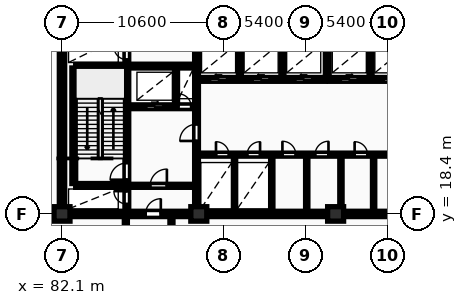
"""IFC4 building model, lengths in metres.
Left out: names, types, materials, properties, quantities, classifications, styles, units other than length and angle.
Written with IfcOpenShell. Run it as: python <this file> out.ifc"""

import sys

from ifc_helpers import new_model, si_unit, direction, frame, frame_2d, origin, origin_2d, place, context, subcontext, project, spatial, rectangle, extrude, element, fill, save


model = new_model("IFC4")
c1 = context("Model", 3, precision=1e-05, world=origin(), true_north=direction((0.0, 1.0)))
c2 = subcontext(c1, "Body", "Model", "MODEL_VIEW")
j1 = project(units=[si_unit("LENGTHUNIT", "METRE"), si_unit("PLANEANGLEUNIT", "RADIAN")], contexts=[c1])
p1 = place(None, origin())
s1 = spatial("IfcSite", under=j1, at=p1, CompositionType="ELEMENT")
p2 = place(p1, origin())
s2 = spatial("IfcBuilding", under=s1, at=p2, CompositionType="ELEMENT")
p3 = place(p2, origin())
s3 = spatial("IfcBuildingStorey", under=s2, at=p3, CompositionType="ELEMENT", Elevation=0.0)
for number, where, z_axis, x_axis in (
    (1, (82.1, 18.4, 0.0), (0.0, 0.0, 1.0), (1.0, 0.0, 0.0)),
    (2, (91.1, 18.4, 0.0), (0.0, 0.0, 1.0), (1.0, 0.0, 0.0)),
    (3, (100.1, 18.4, 0.0), (0.0, 0.0, 1.0), (1.0, 0.0, 0.0)),
):
    element("IfcColumn", number, at=place(p3, frame(where, z_axis=z_axis, x_axis=x_axis)), inside=s3, PredefinedType="COLUMN", context=c2, shape_type="SweptSolid", body=[
        extrude(rectangle(XDim=1.05, YDim=0.95, at=origin_2d()), origin(), (0.0, 0.0, 1.0), 5.4),
    ])
p4 = place(p3, frame((82.1, 18.575, 0.0), z_axis=(0.0, 0.0, 1.0), x_axis=(0.0, 1.0, 0.0)))
e4 = element("IfcWall", 4, at=p4, inside=s3, PredefinedType="SHEAR", context=c2, shape_type="SweptSolid", body=[
    extrude(rectangle(XDim=11.65, YDim=0.35, at=frame_2d((5.825, 0.0))), origin(), (0.0, 0.0, 1.0), 5.4),
])
p5 = place(p3, frame((81.925, 18.4, 0.0), z_axis=(0.0, 0.0, 1.0), x_axis=(1.0, 0.0, 0.0)))
e5 = element("IfcWall", 5, at=p5, inside=s3, PredefinedType="SHEAR", context=c2, shape_type="SweptSolid", body=[
    extrude(rectangle(XDim=36.265, YDim=0.35, at=frame_2d((18.132, 0.0))), origin(), (0.0, 0.0, 1.0), 5.4),
])
p6 = place(p5, frame((5.675, 0.0, 0.0)))
e6 = element("IfcOpeningElement", 6, at=p6, cuts=e5, PredefinedType="OPENING", context=c2, shape_type="SweptSolid", body=[
    extrude(rectangle(XDim=1.0, YDim=2.15, at=frame_2d((0.5, 1.075))), frame((0.0, 0.185, 0.0), z_axis=(0.0, -1.0, 0.0), x_axis=(1.0, 0.0, 0.0)), (0.0, 0.0, 1.0), 0.37),
])
p7 = place(p5, frame((21.925, 0.0, 0.0)))
e7 = element("IfcOpeningElement", 7, at=p7, cuts=e5, PredefinedType="OPENING", context=c2, shape_type="SweptSolid", body=[
    extrude(rectangle(XDim=1.5, YDim=2.2, at=frame_2d((0.75, 1.1))), frame((0.0, 0.185, 0.0), z_axis=(0.0, -1.0, 0.0), x_axis=(1.0, 0.0, 0.0)), (0.0, 0.0, 1.0), 0.37),
])
p8 = place(p5, frame((29.875, 0.0, 0.0)))
e8 = element("IfcOpeningElement", 8, at=p8, cuts=e5, PredefinedType="OPENING", context=c2, shape_type="SweptSolid", body=[
    extrude(rectangle(XDim=1.0, YDim=2.15, at=frame_2d((0.5, 1.075))), frame((0.0, 0.185, 0.0), z_axis=(0.0, -1.0, 0.0), x_axis=(1.0, 0.0, 0.0)), (0.0, 0.0, 1.0), 0.37),
])
p9 = place(p3, frame((82.875, 20.4, 0.0), z_axis=(0.0, 0.0, 1.0), x_axis=(0.0, 1.0, 0.0)))
e9 = element("IfcWall", 9, at=p9, inside=s3, PredefinedType="SHEAR", context=c2, shape_type="SweptSolid", body=[
    extrude(rectangle(XDim=7.6, YDim=0.25, at=frame_2d((3.8, 0.0))), origin(), (0.0, 0.0, 1.0), 5.4),
])
p10 = place(p3, frame((86.365, 18.6, 0.0), z_axis=(0.0, 0.0, 1.0), x_axis=(0.0, 1.0, 0.0)))
e10 = element("IfcWall", 10, at=p10, inside=s3, PredefinedType="SHEAR", context=c2, shape_type="SweptSolid", body=[
    extrude(rectangle(XDim=11.6, YDim=0.25, at=frame_2d((5.8, 0.0))), origin(), (0.0, 0.0, 1.0), 5.4),
])
p11 = place(p10, frame((0.45, 0.0, 0.0)))
e11 = element("IfcOpeningElement", 11, at=p11, cuts=e10, PredefinedType="OPENING", context=c2, shape_type="SweptSolid", body=[
    extrude(rectangle(XDim=0.85, YDim=2.05, at=frame_2d((0.425, 1.025))), frame((0.0, 0.135, 0.0), z_axis=(0.0, -1.0, 0.0), x_axis=(1.0, 0.0, 0.0)), (0.0, 0.0, 1.0), 0.27),
])
p12 = place(p10, frame((2.05, 0.0, 0.0)))
e12 = element("IfcOpeningElement", 12, at=p12, cuts=e10, PredefinedType="OPENING", context=c2, shape_type="SweptSolid", body=[
    extrude(rectangle(XDim=1.1, YDim=2.1, at=frame_2d((0.55, 1.05))), frame((0.0, 0.135, 0.0), z_axis=(0.0, -1.0, 0.0), x_axis=(1.0, 0.0, 0.0)), (0.0, 0.0, 1.0), 0.27),
])
p13 = place(p10, frame((9.95, 0.0, 0.0)))
e13 = element("IfcOpeningElement", 13, at=p13, cuts=e10, PredefinedType="OPENING", context=c2, shape_type="SweptSolid", body=[
    extrude(rectangle(XDim=0.85, YDim=2.05, at=frame_2d((0.425, 1.025))), frame((0.0, 0.135, 0.0), z_axis=(0.0, -1.0, 0.0), x_axis=(1.0, 0.0, 0.0)), (0.0, 0.0, 1.0), 0.27),
])
p14 = place(p3, frame((83.0, 20.275, 0.0), z_axis=(0.0, 0.0, 1.0), x_axis=(1.0, 0.0, 0.0)))
e14 = element("IfcWall", 14, at=p14, inside=s3, PredefinedType="SHEAR", context=c2, shape_type="SweptSolid", body=[
    extrude(rectangle(XDim=3.24, YDim=0.25, at=frame_2d((1.62, 0.0))), origin(), (0.0, 0.0, 1.0), 5.4),
])
p15 = place(p3, frame((83.0, 28.125, 0.0), z_axis=(0.0, 0.0, 1.0), x_axis=(1.0, 0.0, 0.0)))
e15 = element("IfcWall", 15, at=p15, inside=s3, PredefinedType="SHEAR", context=c2, shape_type="SweptSolid", body=[
    extrude(rectangle(XDim=7.82, YDim=0.25, at=frame_2d((3.91, 0.0))), origin(), (0.0, 0.0, 1.0), 5.4),
])
p16 = place(p3, frame((86.5, 25.45, 0.0), z_axis=(0.0, 0.0, 1.0), x_axis=(1.0, 0.0, 0.0)))
e16 = element("IfcWall", 16, at=p16, inside=s3, PredefinedType="SHEAR", context=c2, shape_type="SweptSolid", body=[
    extrude(rectangle(XDim=4.32, YDim=0.25, at=frame_2d((2.16, 0.0))), origin(), (0.0, 0.0, 1.0), 5.4),
])
p17 = place(p16, frame((1.14, 0.0, 0.0)))
e17 = element("IfcOpeningElement", 17, at=p17, cuts=e16, PredefinedType="OPENING", context=c2, shape_type="SweptSolid", body=[
    extrude(rectangle(XDim=1.12, YDim=2.12, at=frame_2d((0.56, 1.06))), frame((0.0, 0.135, 0.0), z_axis=(0.0, -1.0, 0.0), x_axis=(1.0, 0.0, 0.0)), (0.0, 0.0, 1.0), 0.27),
])
p18 = place(p16, frame((3.25, 0.0, 0.0)))
e18 = element("IfcOpeningElement", 18, at=p18, cuts=e16, PredefinedType="OPENING", context=c2, shape_type="SweptSolid", body=[
    extrude(rectangle(XDim=0.85, YDim=2.05, at=frame_2d((0.425, 1.025))), frame((0.0, 0.135, 0.0), z_axis=(0.0, -1.0, 0.0), x_axis=(1.0, 0.0, 0.0)), (0.0, 0.0, 1.0), 0.27),
])
p19 = place(p3, frame((89.6, 25.58, 0.0), z_axis=(0.0, 0.0, 1.0), x_axis=(0.0, 1.0, 0.0)))
e19 = element("IfcWall", 19, at=p19, inside=s3, PredefinedType="PARTITIONING", context=c2, shape_type="SweptSolid", body=[
    extrude(rectangle(XDim=2.42, YDim=0.2, at=frame_2d((1.21, 0.0))), origin(), (0.0, 0.0, 1.0), 5.1),
])
p20 = place(p3, frame((86.5, 20.25, 0.0), z_axis=(0.0, 0.0, 1.0), x_axis=(1.0, 0.0, 0.0)))
e20 = element("IfcWall", 20, at=p20, inside=s3, PredefinedType="PARTITIONING", context=c2, shape_type="SweptSolid", body=[
    extrude(rectangle(XDim=4.32, YDim=0.2, at=frame_2d((2.16, 0.0))), origin(), (0.0, 0.0, 1.0), 5.1),
])
p21 = place(p20, frame((1.4, 0.0, 0.0)))
e21 = element("IfcOpeningElement", 21, at=p21, cuts=e20, PredefinedType="OPENING", context=c2, shape_type="SweptSolid", body=[
    extrude(rectangle(XDim=1.1, YDim=2.1, at=frame_2d((0.55, 1.05))), frame((0.0, 0.11, 0.0), z_axis=(0.0, -1.0, 0.0), x_axis=(1.0, 0.0, 0.0)), (0.0, 0.0, 1.0), 0.22),
])
p22 = place(p3, frame((90.95, 18.6, 0.0), z_axis=(0.0, 0.0, 1.0), x_axis=(0.0, 1.0, 0.0)))
e22 = element("IfcWall", 22, at=p22, inside=s3, PredefinedType="SHEAR", context=c2, shape_type="SweptSolid", body=[
    extrude(rectangle(XDim=11.6, YDim=0.25, at=frame_2d((5.8, 0.0))), origin(), (0.0, 0.0, 1.0), 5.4),
])
p23 = place(p22, frame((4.6, 0.0, 0.0)))
e23 = element("IfcOpeningElement", 23, at=p23, cuts=e22, PredefinedType="OPENING", context=c2, shape_type="SweptSolid", body=[
    extrude(rectangle(XDim=1.1, YDim=2.1, at=frame_2d((0.55, 1.05))), frame((0.0, 0.135, 0.0), z_axis=(0.0, -1.0, 0.0), x_axis=(1.0, 0.0, 0.0)), (0.0, 0.0, 1.0), 0.27),
])
for number, where, z_axis, x_axis in (
    (24, (93.8, 27.38, 0.0), (0.0, 0.0, 1.0), (0.0, 1.0, 0.0)),
    (25, (96.6, 27.38, 0.0), (0.0, 0.0, 1.0), (0.0, 1.0, 0.0)),
):
    element("IfcWall", number, at=place(p3, frame(where, z_axis=z_axis, x_axis=x_axis)), inside=s3, PredefinedType="PARTITIONING", context=c2, shape_type="SweptSolid", body=[
        extrude(rectangle(XDim=2.82, YDim=0.2, at=frame_2d((1.41, 0.0))), origin(), (0.0, 0.0, 1.0), 5.1),
    ])
p24 = place(p3, frame((91.08, 27.25, 0.0), z_axis=(0.0, 0.0, 1.0), x_axis=(1.0, 0.0, 0.0)))
e26 = element("IfcWall", 26, at=p24, inside=s3, PredefinedType="SHEAR", context=c2, shape_type="SweptSolid", body=[
    extrude(rectangle(XDim=8.34, YDim=0.25, at=frame_2d((4.17, 0.0))), origin(), (0.0, 0.0, 1.0), 5.4),
])
p25 = place(p24, frame((0.76, 0.0, 0.0)))
e27 = element("IfcOpeningElement", 27, at=p25, cuts=e26, PredefinedType="OPENING", context=c2, shape_type="SweptSolid", body=[
    extrude(rectangle(XDim=1.12, YDim=2.12, at=frame_2d((0.56, 1.06))), frame((0.0, 0.135, 0.0), z_axis=(0.0, -1.0, 0.0), x_axis=(1.0, 0.0, 0.0)), (0.0, 0.0, 1.0), 0.27),
])
p26 = place(p24, frame((3.56, 0.0, 0.0)))
e28 = element("IfcOpeningElement", 28, at=p26, cuts=e26, PredefinedType="OPENING", context=c2, shape_type="SweptSolid", body=[
    extrude(rectangle(XDim=1.12, YDim=2.12, at=frame_2d((0.56, 1.06))), frame((0.0, 0.135, 0.0), z_axis=(0.0, -1.0, 0.0), x_axis=(1.0, 0.0, 0.0)), (0.0, 0.0, 1.0), 0.27),
])
p27 = place(p24, frame((6.36, 0.0, 0.0)))
e29 = element("IfcOpeningElement", 29, at=p27, cuts=e26, PredefinedType="OPENING", context=c2, shape_type="SweptSolid", body=[
    extrude(rectangle(XDim=1.12, YDim=2.12, at=frame_2d((0.56, 1.06))), frame((0.0, 0.135, 0.0), z_axis=(0.0, -1.0, 0.0), x_axis=(1.0, 0.0, 0.0)), (0.0, 0.0, 1.0), 0.27),
])
p28 = place(p3, frame((99.55, 27.25, 0.0), z_axis=(0.0, 0.0, 1.0), x_axis=(0.0, 1.0, 0.0)))
e30 = element("IfcWall", 30, at=p28, inside=s3, PredefinedType="SHEAR", context=c2, shape_type="SweptSolid", body=[
    extrude(rectangle(XDim=2.95, YDim=0.25, at=frame_2d((1.475, 0.0))), origin(), (0.0, 0.0, 1.0), 5.4),
])
p29 = place(p3, frame((102.4, 27.38, 0.0), z_axis=(0.0, 0.0, 1.0), x_axis=(0.0, 1.0, 0.0)))
e31 = element("IfcWall", 31, at=p29, inside=s3, PredefinedType="PARTITIONING", context=c2, shape_type="SweptSolid", body=[
    extrude(rectangle(XDim=2.82, YDim=0.2, at=frame_2d((1.41, 0.0))), origin(), (0.0, 0.0, 1.0), 5.1),
])
p30 = place(p3, frame((99.68, 27.25, 0.0), z_axis=(0.0, 0.0, 1.0), x_axis=(1.0, 0.0, 0.0)))
e32 = element("IfcWall", 32, at=p30, inside=s3, PredefinedType="SHEAR", context=c2, shape_type="SweptSolid", body=[
    extrude(rectangle(XDim=10.54, YDim=0.25, at=frame_2d((5.27, 0.0))), origin(), (0.0, 0.0, 1.0), 5.4),
])
p31 = place(p30, frame((0.76, 0.0, 0.0)))
e33 = element("IfcOpeningElement", 33, at=p31, cuts=e32, PredefinedType="OPENING", context=c2, shape_type="SweptSolid", body=[
    extrude(rectangle(XDim=1.12, YDim=2.12, at=frame_2d((0.56, 1.06))), frame((0.0, 0.135, 0.0), z_axis=(0.0, -1.0, 0.0), x_axis=(1.0, 0.0, 0.0)), (0.0, 0.0, 1.0), 0.27),
])
p32 = place(p30, frame((3.56, 0.0, 0.0)))
e34 = element("IfcOpeningElement", 34, at=p32, cuts=e32, PredefinedType="OPENING", context=c2, shape_type="SweptSolid", body=[
    extrude(rectangle(XDim=1.12, YDim=2.12, at=frame_2d((0.56, 1.06))), frame((0.0, 0.135, 0.0), z_axis=(0.0, -1.0, 0.0), x_axis=(1.0, 0.0, 0.0)), (0.0, 0.0, 1.0), 0.27),
])
p33 = place(p30, frame((6.36, 0.0, 0.0)))
e35 = element("IfcOpeningElement", 35, at=p33, cuts=e32, PredefinedType="OPENING", context=c2, shape_type="SweptSolid", body=[
    extrude(rectangle(XDim=1.12, YDim=2.12, at=frame_2d((0.56, 1.06))), frame((0.0, 0.135, 0.0), z_axis=(0.0, -1.0, 0.0), x_axis=(1.0, 0.0, 0.0)), (0.0, 0.0, 1.0), 0.27),
])
p34 = place(p30, frame((8.92, 0.0, 0.0)))
e36 = element("IfcOpeningElement", 36, at=p34, cuts=e32, PredefinedType="OPENING", context=c2, shape_type="SweptSolid", body=[
    extrude(rectangle(XDim=0.85, YDim=2.05, at=frame_2d((0.425, 1.025))), frame((0.0, 0.135, 0.0), z_axis=(0.0, -1.0, 0.0), x_axis=(1.0, 0.0, 0.0)), (0.0, 0.0, 1.0), 0.27),
])
for number, where, z_axis, x_axis in (
    (37, (93.45, 18.6, 0.0), (0.0, 0.0, 1.0), (0.0, 1.0, 0.0)),
    (38, (95.9, 18.6, 0.0), (0.0, 0.0, 1.0), (0.0, 1.0, 0.0)),
    (39, (98.2, 18.6, 0.0), (0.0, 0.0, 1.0), (0.0, 1.0, 0.0)),
):
    element("IfcWall", number, at=place(p3, frame(where, z_axis=z_axis, x_axis=x_axis)), inside=s3, PredefinedType="PARTITIONING", context=c2, shape_type="SweptSolid", body=[
        extrude(rectangle(XDim=3.6, YDim=0.15, at=frame_2d((1.8, 0.0))), origin(), (0.0, 0.0, 1.0), 5.1),
    ])
p35 = place(p3, frame((100.45, 18.6, 0.0), z_axis=(0.0, 0.0, 1.0), x_axis=(0.0, 1.0, 0.0)))
e40 = element("IfcWall", 40, at=p35, inside=s3, PredefinedType="PARTITIONING", context=c2, shape_type="SweptSolid", body=[
    extrude(rectangle(XDim=3.6, YDim=0.15, at=frame_2d((1.8, 0.0))), origin(), (0.0, 0.0, 1.0), 4.35),
])
p36 = place(p3, frame((102.6, 18.6, 0.0), z_axis=(0.0, 0.0, 1.0), x_axis=(0.0, 1.0, 0.0)))
e41 = element("IfcWall", 41, at=p36, inside=s3, PredefinedType="PARTITIONING", context=c2, shape_type="SweptSolid", body=[
    extrude(rectangle(XDim=3.6, YDim=0.15, at=frame_2d((1.8, 0.0))), origin(), (0.0, 0.0, 1.0), 5.1),
])
p37 = place(p3, frame((91.08, 22.3, 0.0), z_axis=(0.0, 0.0, 1.0), x_axis=(1.0, 0.0, 0.0)))
e42 = element("IfcWall", 42, at=p37, inside=s3, PredefinedType="PARTITIONING", context=c2, shape_type="SweptSolid", body=[
    extrude(rectangle(XDim=19.14, YDim=0.2, at=frame_2d((9.57, 0.0))), origin(), (0.0, 0.0, 1.0), 5.1),
])
p38 = place(p37, frame((1.15, 0.0, 0.0)))
e43 = element("IfcOpeningElement", 43, at=p38, cuts=e42, PredefinedType="OPENING", context=c2, shape_type="SweptSolid", body=[
    extrude(rectangle(XDim=0.85, YDim=2.05, at=frame_2d((0.425, 1.025))), frame((0.0, 0.11, 0.0), z_axis=(0.0, -1.0, 0.0), x_axis=(1.0, 0.0, 0.0)), (0.0, 0.0, 1.0), 0.22),
])
p39 = place(p37, frame((3.2, 0.0, 0.0)))
e44 = element("IfcOpeningElement", 44, at=p39, cuts=e42, PredefinedType="OPENING", context=c2, shape_type="SweptSolid", body=[
    extrude(rectangle(XDim=0.85, YDim=2.05, at=frame_2d((0.425, 1.025))), frame((0.0, 0.11, 0.0), z_axis=(0.0, -1.0, 0.0), x_axis=(1.0, 0.0, 0.0)), (0.0, 0.0, 1.0), 0.22),
])
p40 = place(p37, frame((12.72, 0.0, 0.0)))
e45 = element("IfcOpeningElement", 45, at=p40, cuts=e42, PredefinedType="OPENING", context=c2, shape_type="SweptSolid", body=[
    extrude(rectangle(XDim=1.5, YDim=2.2, at=frame_2d((0.75, 1.1))), frame((0.0, 0.11, 0.0), z_axis=(0.0, -1.0, 0.0), x_axis=(1.0, 0.0, 0.0)), (0.0, 0.0, 1.0), 0.22),
])
p41 = place(p37, frame((5.52, 0.0, 0.0)))
e46 = element("IfcOpeningElement", 46, at=p41, cuts=e42, PredefinedType="OPENING", context=c2, shape_type="SweptSolid", body=[
    extrude(rectangle(XDim=0.88, YDim=2.06, at=frame_2d((0.44, 1.03))), frame((0.0, 0.11, 0.0), z_axis=(0.0, -1.0, 0.0), x_axis=(1.0, 0.0, 0.0)), (0.0, 0.0, 1.0), 0.22),
])
p42 = place(p37, frame((7.67, 0.0, 0.0)))
e47 = element("IfcOpeningElement", 47, at=p42, cuts=e42, PredefinedType="OPENING", context=c2, shape_type="SweptSolid", body=[
    extrude(rectangle(XDim=0.88, YDim=2.06, at=frame_2d((0.44, 1.03))), frame((0.0, 0.11, 0.0), z_axis=(0.0, -1.0, 0.0), x_axis=(1.0, 0.0, 0.0)), (0.0, 0.0, 1.0), 0.22),
])
p43 = place(p37, frame((10.27, 0.0, 0.0)))
e48 = element("IfcOpeningElement", 48, at=p43, cuts=e42, PredefinedType="OPENING", context=c2, shape_type="SweptSolid", body=[
    extrude(rectangle(XDim=0.85, YDim=2.05, at=frame_2d((0.425, 1.025))), frame((0.0, 0.11, 0.0), z_axis=(0.0, -1.0, 0.0), x_axis=(1.0, 0.0, 0.0)), (0.0, 0.0, 1.0), 0.22),
])
p44 = place(p37, frame((15.92, 0.0, 0.0)))
e49 = element("IfcOpeningElement", 49, at=p44, cuts=e42, PredefinedType="OPENING", context=c2, shape_type="SweptSolid", body=[
    extrude(rectangle(XDim=0.96, YDim=2.1, at=frame_2d((0.48, 1.05))), frame((0.0, 0.11, 0.0), z_axis=(0.0, -1.0, 0.0), x_axis=(1.0, 0.0, 0.0)), (0.0, 0.0, 1.0), 0.22),
])
p45 = place(p3, frame((86.3, -26.2, 0.0), z_axis=(0.0, 0.0, 1.0), x_axis=(0.0, 1.0, 0.0)))
e50 = element("IfcWall", 50, at=p45, inside=s3, PredefinedType="PARTITIONING", context=c2, shape_type="SweptSolid", body=[
    extrude(rectangle(XDim=44.35, YDim=0.2, at=frame_2d((22.175, 0.0))), origin(), (0.0, 0.0, 1.0), 5.1),
])
p46 = place(p45, frame((16.0, 0.0, 0.0)))
e51 = element("IfcOpeningElement", 51, at=p46, cuts=e50, PredefinedType="OPENING", context=c2, shape_type="SweptSolid", body=[
    extrude(rectangle(XDim=1.1, YDim=2.1, at=frame_2d((0.55, 1.05))), frame((0.0, 0.11, 0.0), z_axis=(0.0, -1.0, 0.0), x_axis=(1.0, 0.0, 0.0)), (0.0, 0.0, 1.0), 0.22),
])
p47 = place(p3, frame((89.3, -26.2, 0.0), z_axis=(0.0, 0.0, 1.0), x_axis=(0.0, 1.0, 0.0)))
e52 = element("IfcWall", 52, at=p47, inside=s3, PredefinedType="PARTITIONING", context=c2, shape_type="SweptSolid", body=[
    extrude(rectangle(XDim=44.35, YDim=0.2, at=frame_2d((22.175, 0.0))), origin(), (0.0, 0.0, 1.0), 5.1),
])
p48 = place(p6, origin())
e53 = element("IfcDoor", 53, at=p48, inside=s3, OperationType="SINGLE_SWING_RIGHT", PredefinedType="DOOR", context=c2, shape_type="SweptSolid", body=[
    extrude(rectangle(XDim=1.0, YDim=2.15, at=frame_2d((0.5, 1.075))), frame((0.0, 0.025, 0.0), z_axis=(0.0, -1.0, 0.0), x_axis=(1.0, 0.0, 0.0)), (0.0, 0.0, 1.0), 0.05),
])
fill(e6, e53)
p49 = place(p11, origin())
e54 = element("IfcDoor", 54, at=p49, inside=s3, OperationType="SINGLE_SWING_RIGHT", PredefinedType="DOOR", context=c2, shape_type="SweptSolid", body=[
    extrude(rectangle(XDim=0.85, YDim=2.05, at=frame_2d((0.425, 1.025))), frame((0.0, 0.025, 0.0), z_axis=(0.0, -1.0, 0.0), x_axis=(1.0, 0.0, 0.0)), (0.0, 0.0, 1.0), 0.05),
])
fill(e11, e54)
p50 = place(p12, origin())
e55 = element("IfcDoor", 55, at=p50, inside=s3, OperationType="SINGLE_SWING_LEFT", PredefinedType="DOOR", context=c2, shape_type="SweptSolid", body=[
    extrude(rectangle(XDim=1.1, YDim=2.1, at=frame_2d((0.55, 1.05))), frame((0.0, 0.025, 0.0), z_axis=(0.0, -1.0, 0.0), x_axis=(1.0, 0.0, 0.0)), (0.0, 0.0, 1.0), 0.05),
])
fill(e12, e55)
p51 = place(p13, origin())
e56 = element("IfcDoor", 56, at=p51, inside=s3, OperationType="SINGLE_SWING_RIGHT", PredefinedType="DOOR", context=c2, shape_type="SweptSolid", body=[
    extrude(rectangle(XDim=0.85, YDim=2.05, at=frame_2d((0.425, 1.025))), frame((0.0, 0.025, 0.0), z_axis=(0.0, -1.0, 0.0), x_axis=(1.0, 0.0, 0.0)), (0.0, 0.0, 1.0), 0.05),
])
fill(e13, e56)
p52 = place(p17, origin())
e57 = element("IfcDoor", 57, at=p52, inside=s3, OperationType="SLIDING_TO_RIGHT", PredefinedType="DOOR", context=c2, shape_type="SweptSolid", body=[
    extrude(rectangle(XDim=1.12, YDim=2.12, at=frame_2d((0.56, 1.06))), frame((0.0, 0.025, 0.0), z_axis=(0.0, -1.0, 0.0), x_axis=(1.0, 0.0, 0.0)), (0.0, 0.0, 1.0), 0.05),
])
fill(e17, e57)
p53 = place(p18, origin())
e58 = element("IfcDoor", 58, at=p53, inside=s3, OperationType="SINGLE_SWING_LEFT", PredefinedType="DOOR", context=c2, shape_type="SweptSolid", body=[
    extrude(rectangle(XDim=0.85, YDim=2.05, at=frame_2d((0.425, 1.025))), frame((0.0, 0.025, 0.0), z_axis=(0.0, -1.0, 0.0), x_axis=(1.0, 0.0, 0.0)), (0.0, 0.0, 1.0), 0.05),
])
fill(e18, e58)
p54 = place(p21, origin())
e59 = element("IfcDoor", 59, at=p54, inside=s3, OperationType="SINGLE_SWING_RIGHT", PredefinedType="DOOR", context=c2, shape_type="SweptSolid", body=[
    extrude(rectangle(XDim=1.1, YDim=2.1, at=frame_2d((0.55, 1.05))), frame((0.0, 0.025, 0.0), z_axis=(0.0, -1.0, 0.0), x_axis=(1.0, 0.0, 0.0)), (0.0, 0.0, 1.0), 0.05),
])
fill(e21, e59)
p55 = place(p23, origin())
e60 = element("IfcDoor", 60, at=p55, inside=s3, OperationType="SINGLE_SWING_LEFT", PredefinedType="DOOR", context=c2, shape_type="SweptSolid", body=[
    extrude(rectangle(XDim=1.1, YDim=2.1, at=frame_2d((0.55, 1.05))), frame((0.0, 0.025, 0.0), z_axis=(0.0, -1.0, 0.0), x_axis=(1.0, 0.0, 0.0)), (0.0, 0.0, 1.0), 0.05),
])
fill(e23, e60)
p56 = place(p25, origin())
e61 = element("IfcDoor", 61, at=p56, inside=s3, OperationType="SLIDING_TO_LEFT", PredefinedType="DOOR", context=c2, shape_type="SweptSolid", body=[
    extrude(rectangle(XDim=1.12, YDim=2.12, at=frame_2d((0.56, 1.06))), frame((0.0, 0.025, 0.0), z_axis=(0.0, -1.0, 0.0), x_axis=(1.0, 0.0, 0.0)), (0.0, 0.0, 1.0), 0.05),
])
fill(e27, e61)
p57 = place(p26, origin())
e62 = element("IfcDoor", 62, at=p57, inside=s3, OperationType="SLIDING_TO_LEFT", PredefinedType="DOOR", context=c2, shape_type="SweptSolid", body=[
    extrude(rectangle(XDim=1.12, YDim=2.12, at=frame_2d((0.56, 1.06))), frame((0.0, 0.025, 0.0), z_axis=(0.0, -1.0, 0.0), x_axis=(1.0, 0.0, 0.0)), (0.0, 0.0, 1.0), 0.05),
])
fill(e28, e62)
p58 = place(p27, origin())
e63 = element("IfcDoor", 63, at=p58, inside=s3, OperationType="SLIDING_TO_LEFT", PredefinedType="DOOR", context=c2, shape_type="SweptSolid", body=[
    extrude(rectangle(XDim=1.12, YDim=2.12, at=frame_2d((0.56, 1.06))), frame((0.0, 0.025, 0.0), z_axis=(0.0, -1.0, 0.0), x_axis=(1.0, 0.0, 0.0)), (0.0, 0.0, 1.0), 0.05),
])
fill(e29, e63)
p59 = place(p31, origin())
e64 = element("IfcDoor", 64, at=p59, inside=s3, OperationType="SLIDING_TO_RIGHT", PredefinedType="DOOR", context=c2, shape_type="SweptSolid", body=[
    extrude(rectangle(XDim=1.12, YDim=2.12, at=frame_2d((0.56, 1.06))), frame((0.0, 0.025, 0.0), z_axis=(0.0, -1.0, 0.0), x_axis=(1.0, 0.0, 0.0)), (0.0, 0.0, 1.0), 0.05),
])
fill(e33, e64)
p60 = place(p32, origin())
e65 = element("IfcDoor", 65, at=p60, inside=s3, OperationType="SLIDING_TO_RIGHT", PredefinedType="DOOR", context=c2, shape_type="SweptSolid", body=[
    extrude(rectangle(XDim=1.12, YDim=2.12, at=frame_2d((0.56, 1.06))), frame((0.0, 0.025, 0.0), z_axis=(0.0, -1.0, 0.0), x_axis=(1.0, 0.0, 0.0)), (0.0, 0.0, 1.0), 0.05),
])
fill(e34, e65)
p61 = place(p38, origin())
e66 = element("IfcDoor", 66, at=p61, inside=s3, OperationType="SINGLE_SWING_LEFT", PredefinedType="DOOR", context=c2, shape_type="SweptSolid", body=[
    extrude(rectangle(XDim=0.85, YDim=2.05, at=frame_2d((0.425, 1.025))), frame((0.0, 0.025, 0.0), z_axis=(0.0, -1.0, 0.0), x_axis=(1.0, 0.0, 0.0)), (0.0, 0.0, 1.0), 0.05),
])
fill(e43, e66)
p62 = place(p39, origin())
e67 = element("IfcDoor", 67, at=p62, inside=s3, OperationType="SINGLE_SWING_RIGHT", PredefinedType="DOOR", context=c2, shape_type="SweptSolid", body=[
    extrude(rectangle(XDim=0.85, YDim=2.05, at=frame_2d((0.425, 1.025))), frame((0.0, 0.025, 0.0), z_axis=(0.0, -1.0, 0.0), x_axis=(1.0, 0.0, 0.0)), (0.0, 0.0, 1.0), 0.05),
])
fill(e44, e67)
p63 = place(p41, origin())
e68 = element("IfcDoor", 68, at=p63, inside=s3, OperationType="SINGLE_SWING_LEFT", PredefinedType="DOOR", context=c2, shape_type="SweptSolid", body=[
    extrude(rectangle(XDim=0.88, YDim=2.06, at=frame_2d((0.44, 1.03))), frame((0.0, 0.025, 0.0), z_axis=(0.0, -1.0, 0.0), x_axis=(1.0, 0.0, 0.0)), (0.0, 0.0, 1.0), 0.05),
])
fill(e46, e68)
p64 = place(p42, origin())
e69 = element("IfcDoor", 69, at=p64, inside=s3, OperationType="SINGLE_SWING_RIGHT", PredefinedType="DOOR", context=c2, shape_type="SweptSolid", body=[
    extrude(rectangle(XDim=0.88, YDim=2.06, at=frame_2d((0.44, 1.03))), frame((0.0, 0.025, 0.0), z_axis=(0.0, -1.0, 0.0), x_axis=(1.0, 0.0, 0.0)), (0.0, 0.0, 1.0), 0.05),
])
fill(e47, e69)
p65 = place(p43, origin())
e70 = element("IfcDoor", 70, at=p65, inside=s3, OperationType="SINGLE_SWING_LEFT", PredefinedType="DOOR", context=c2, shape_type="SweptSolid", body=[
    extrude(rectangle(XDim=0.85, YDim=2.05, at=frame_2d((0.425, 1.025))), frame((0.0, 0.025, 0.0), z_axis=(0.0, -1.0, 0.0), x_axis=(1.0, 0.0, 0.0)), (0.0, 0.0, 1.0), 0.05),
])
fill(e48, e70)
save(model, sys.argv[1])
